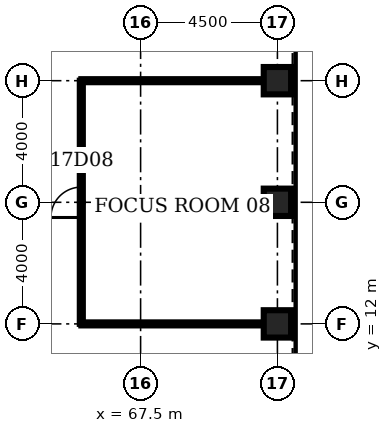
"""IFC4 building model, lengths in metres.
Left out: names, types, materials, properties, quantities, classifications, styles, units other than length and angle.
Written with IfcOpenShell. Run it as: python <this file> out.ifc"""

import sys

from ifc_helpers import new_model, si_unit, direction, frame, frame_2d, origin, origin_2d, place, context, subcontext, project, spatial, rectangle, hollow_rectangle, extrude, element, fill, save


model = new_model("IFC4")
c1 = context("Model", 3, precision=1e-05, world=origin(), true_north=direction((0.0, 1.0)))
c2 = subcontext(c1, "Body", "Model", "MODEL_VIEW")
j1 = project(units=[si_unit("LENGTHUNIT", "METRE"), si_unit("PLANEANGLEUNIT", "RADIAN")], contexts=[c1])
p1 = place(None, origin())
s1 = spatial("IfcSite", under=j1, at=p1, CompositionType="ELEMENT")
p2 = place(p1, origin())
s2 = spatial("IfcBuilding", under=s1, at=p2, CompositionType="ELEMENT")
p3 = place(p2, frame((0.0, 0.0, 81.5)))
s3 = spatial("IfcBuildingStorey", under=s2, at=p3, CompositionType="ELEMENT", Elevation=81.5)
for number, where, z_axis, x_axis in (
    (1, (72.0, 12.0, 0.0), (0.0, 0.0, 1.0), (1.0, 0.0, 0.0)),
    (2, (72.0, 16.0, 0.0), (0.0, 0.0, 1.0), (1.0, 0.0, 0.0)),
    (3, (72.0, 20.0, 0.0), (0.0, 0.0, 1.0), (1.0, 0.0, 0.0)),
):
    element("IfcColumn", number, at=place(p3, frame(where, z_axis=z_axis, x_axis=x_axis)), inside=s3, PredefinedType="COLUMN", context=c2, shape_type="SweptSolid", body=[
        extrude(hollow_rectangle(XDim=0.9, YDim=0.9, WallThickness=0.11, at=origin_2d()), origin(), (0.0, 0.0, 1.0), 4.5),
    ])
for number, where, z_axis, x_axis in (
    (4, (65.55, 12.0, 0.0), (0.0, 0.0, 1.0), (1.0, 0.0, 0.0)),
    (5, (65.55, 20.0, 0.0), (0.0, 0.0, 1.0), (1.0, 0.0, 0.0)),
):
    element("IfcWall", number, at=place(p3, frame(where, z_axis=z_axis, x_axis=x_axis)), inside=s3, PredefinedType="PARTITIONING", context=c2, shape_type="SweptSolid", body=[
        extrude(rectangle(XDim=6.0, YDim=0.1, at=frame_2d((3.0, 0.0))), origin(), (0.0, 0.0, 1.0), 3.0),
    ])
p4 = place(p3, frame((65.55, 12.0, 0.0), z_axis=(0.0, 0.0, 1.0), x_axis=(0.0, 1.0, 0.0)))
e6 = element("IfcWall", 6, at=p4, inside=s3, PredefinedType="PARTITIONING", context=c2, shape_type="SweptSolid", body=[
    extrude(rectangle(XDim=8.0, YDim=0.1, at=frame_2d((4.0, 0.0))), origin(), (0.0, 0.0, 1.0), 3.0),
])
p5 = place(p4, frame((3.5, 0.0, 0.0)))
e7 = element("IfcOpeningElement", 7, at=p5, cuts=e6, PredefinedType="OPENING", context=c2, shape_type="SweptSolid", body=[
    extrude(rectangle(XDim=1.0, YDim=2.1, at=frame_2d((0.5, 1.05))), frame((0.0, 0.06, 0.0), z_axis=(0.0, -1.0, 0.0), x_axis=(1.0, 0.0, 0.0)), (0.0, 0.0, 1.0), 0.12),
])
p6 = place(p5, origin())
e8 = element("IfcDoor", 8, at=p6, inside=s3, OperationType="SINGLE_SWING_LEFT", PredefinedType="DOOR", context=c2, shape_type="SweptSolid", body=[
    extrude(rectangle(XDim=1.0, YDim=2.1, at=frame_2d((0.5, 1.05))), frame((0.0, 0.025, 0.0), z_axis=(0.0, -1.0, 0.0), x_axis=(1.0, 0.0, 0.0)), (0.0, 0.0, 1.0), 0.05),
])
fill(e7, e8)
save(model, sys.argv[1])
